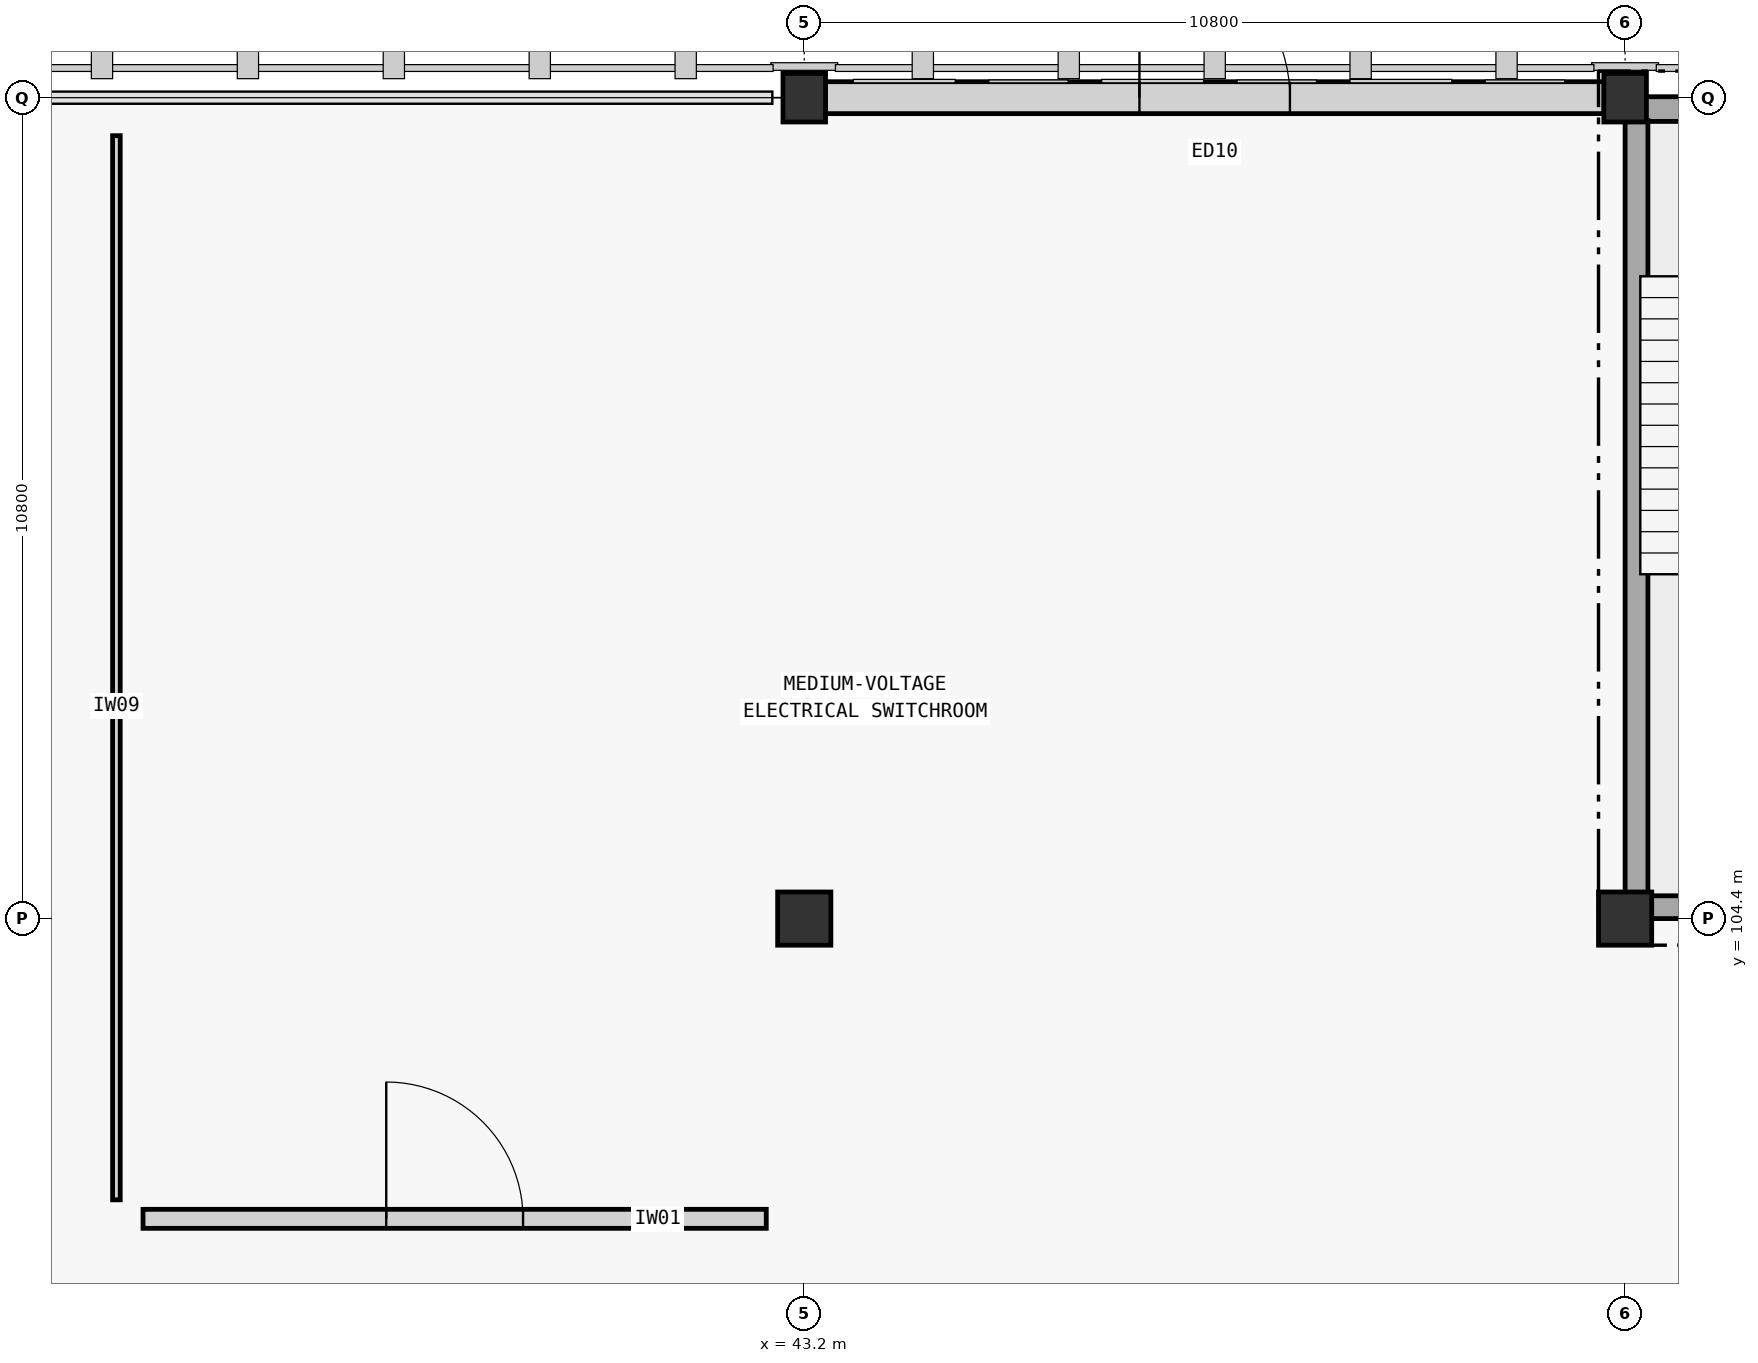
"""IFC4 building model, lengths in metres.
Left out: names, types, materials, properties, quantities, classifications, styles, units other than length and angle.
Written with IfcOpenShell. Run it as: python <this file> out.ifc"""

import sys

from ifc_helpers import new_model, si_unit, direction, frame, frame_2d, origin, origin_2d, place, context, subcontext, project, spatial, rectangle, extrude, element, fill, save


model = new_model("IFC4")
c1 = context("Model", 3, precision=1e-05, world=origin(), true_north=direction((0.0, 1.0)))
c2 = subcontext(c1, "Body", "Model", "MODEL_VIEW")
j1 = project(units=[si_unit("LENGTHUNIT", "METRE"), si_unit("PLANEANGLEUNIT", "RADIAN")], contexts=[c1])
p1 = place(None, origin())
s1 = spatial("IfcSite", under=j1, at=p1, CompositionType="ELEMENT")
p2 = place(p1, origin())
s2 = spatial("IfcBuilding", under=s1, at=p2, CompositionType="ELEMENT")
p3 = place(p2, origin())
s3 = spatial("IfcBuildingStorey", under=s2, at=p3, CompositionType="ELEMENT", Elevation=0.0)
p4 = place(p3, frame((43.2, 104.4, -0.3), z_axis=(0.0, 0.0, 1.0), x_axis=(1.0, 0.0, 0.0)))
e1 = element("IfcColumn", 1, at=p4, inside=s3, PredefinedType="COLUMN", context=c2, shape_type="SweptSolid", body=[
    extrude(rectangle(XDim=0.7, YDim=0.7, at=origin_2d()), origin(), (0.0, 0.0, 1.0), 5.7),
])
p5 = place(p3, frame((43.2, 115.2, -0.3), z_axis=(0.0, 0.0, 1.0), x_axis=(1.0, 0.0, 0.0)))
e2 = element("IfcColumn", 2, at=p5, inside=s3, PredefinedType="COLUMN", context=c2, shape_type="SweptSolid", body=[
    extrude(rectangle(XDim=0.56, YDim=0.64, at=origin_2d()), origin(), (0.0, 0.0, 1.0), 5.7),
])
p6 = place(p3, frame((54.0, 104.4, -0.3), z_axis=(0.0, 0.0, 1.0), x_axis=(1.0, 0.0, 0.0)))
e3 = element("IfcColumn", 3, at=p6, inside=s3, PredefinedType="COLUMN", context=c2, shape_type="SweptSolid", body=[
    extrude(rectangle(XDim=0.7, YDim=0.7, at=origin_2d()), origin(), (0.0, 0.0, 1.0), 5.7),
])
p7 = place(p3, frame((54.0, 115.2, -0.3), z_axis=(0.0, 0.0, 1.0), x_axis=(1.0, 0.0, 0.0)))
e4 = element("IfcColumn", 4, at=p7, inside=s3, PredefinedType="COLUMN", context=c2, shape_type="SweptSolid", body=[
    extrude(rectangle(XDim=0.56, YDim=0.64, at=origin_2d()), origin(), (0.0, 0.0, 1.0), 5.7),
])
p8 = place(p3, frame((64.8, 104.55, 0.0), z_axis=(0.0, 0.0, 1.0), x_axis=(-1.0, 0.0, 0.0)))
e5 = element("IfcWall", 5, at=p8, inside=s3, PredefinedType="SHEAR", context=c2, shape_type="SweptSolid", body=[
    extrude(rectangle(XDim=10.8, YDim=0.3, at=frame_2d((5.4, 0.0))), origin(), (0.0, 0.0, 1.0), 5.4),
])
p9 = place(p3, frame((54.0, 115.05, 0.0), z_axis=(0.0, 0.0, 1.0), x_axis=(1.0, 0.0, 0.0)))
e6 = element("IfcWall", 6, at=p9, inside=s3, PredefinedType="SHEAR", context=c2, shape_type="SweptSolid", body=[
    extrude(rectangle(XDim=10.8, YDim=0.325, at=frame_2d((5.4, 0.0))), origin(), (0.0, 0.0, 1.0), 5.4),
])
p10 = place(p9, frame((1.1, 0.0, 0.0)))
e7 = element("IfcOpeningElement", 7, at=p10, cuts=e6, PredefinedType="OPENING", context=c2, shape_type="SweptSolid", body=[
    extrude(rectangle(XDim=1.82, YDim=2.22, at=frame_2d((0.91, 1.11))), frame((0.0, 0.163, 0.0), z_axis=(0.0, -1.0, 0.0), x_axis=(1.0, 0.0, 0.0)), (0.0, 0.0, 1.0), 0.325),
])
p11 = place(p3, frame((54.15, 104.7, 0.0), z_axis=(0.0, 0.0, 1.0), x_axis=(0.0, 1.0, 0.0)))
e8 = element("IfcWall", 8, at=p11, inside=s3, PredefinedType="SHEAR", context=c2, shape_type="SweptSolid", body=[
    extrude(rectangle(XDim=10.2, YDim=0.3, at=frame_2d((5.1, 0.0))), origin(), (0.0, 0.0, 1.0), 5.4),
])
p12 = place(p3, frame((43.476, 115.2, 0.0), z_axis=(0.0, 0.0, 1.0), x_axis=(1.0, 0.0, 0.0)))
e9 = element("IfcWall", 9, at=p12, inside=s3, PredefinedType="STANDARD", context=c2, shape_type="SweptSolid", body=[
    extrude(rectangle(XDim=10.248, YDim=0.42, at=frame_2d((5.124, 0.0))), origin(), (0.0, 0.0, 1.0), 4.425),
])
p13 = place(p12, frame((4.134, 0.0, 0.0)))
e10 = element("IfcOpeningElement", 10, at=p13, cuts=e9, PredefinedType="OPENING", context=c2, shape_type="SweptSolid", body=[
    extrude(rectangle(XDim=1.98, YDim=2.36, at=frame_2d((0.99, 1.18))), frame((0.0, 0.21, 0.0), z_axis=(0.0, -1.0, 0.0), x_axis=(1.0, 0.0, 0.0)), (0.0, 0.0, 1.0), 0.42),
])
p14 = place(p3, frame((34.5, 100.45, 0.0), z_axis=(0.0, 0.0, 1.0), x_axis=(1.0, 0.0, 0.0)))
e11 = element("IfcWall", 11, at=p14, inside=s3, PredefinedType="STANDARD", context=c2, shape_type="SweptSolid", body=[
    extrude(rectangle(XDim=8.2, YDim=0.25, at=frame_2d((4.1, 0.0))), origin(), (0.0, 0.0, 1.0), 4.2),
])
p15 = place(p14, frame((3.2, 0.0, 0.0)))
e12 = element("IfcOpeningElement", 12, at=p15, cuts=e11, PredefinedType="OPENING", context=c2, shape_type="SweptSolid", body=[
    extrude(rectangle(XDim=1.8, YDim=2.3, at=frame_2d((0.9, 1.15))), frame((0.0, 0.125, 0.0), z_axis=(0.0, -1.0, 0.0), x_axis=(1.0, 0.0, 0.0)), (0.0, 0.0, 1.0), 0.25),
])
p16 = place(p3, frame((34.15, 100.7, 0.0), z_axis=(0.0, 0.0, 1.0), x_axis=(0.0, 1.0, 0.0)))
e13 = element("IfcWall", 13, at=p16, inside=s3, PredefinedType="STANDARD", context=c2, shape_type="SweptSolid", body=[
    extrude(rectangle(XDim=14.0, YDim=0.1, at=frame_2d((7.0, 0.0))), origin(), (0.0, 0.0, 1.0), 4.2),
])
p17 = place(p13, origin())
e14 = element("IfcDoor", 14, at=p17, inside=s3, OperationType="SINGLE_SWING_LEFT", PredefinedType="DOOR", context=c2, shape_type="SweptSolid", body=[
    extrude(rectangle(XDim=1.98, YDim=2.36, at=frame_2d((0.99, 1.18))), frame((0.0, 0.025, 0.0), z_axis=(0.0, -1.0, 0.0), x_axis=(1.0, 0.0, 0.0)), (0.0, 0.0, 1.0), 0.05),
])
fill(e10, e14)
p18 = place(p15, origin())
e15 = element("IfcDoor", 15, at=p18, inside=s3, OperationType="SINGLE_SWING_LEFT", PredefinedType="DOOR", context=c2, shape_type="SweptSolid", body=[
    extrude(rectangle(XDim=1.8, YDim=2.3, at=frame_2d((0.9, 1.15))), frame((0.0, 0.025, 0.0), z_axis=(0.0, -1.0, 0.0), x_axis=(1.0, 0.0, 0.0)), (0.0, 0.0, 1.0), 0.05),
])
fill(e12, e15)
save(model, sys.argv[1])
